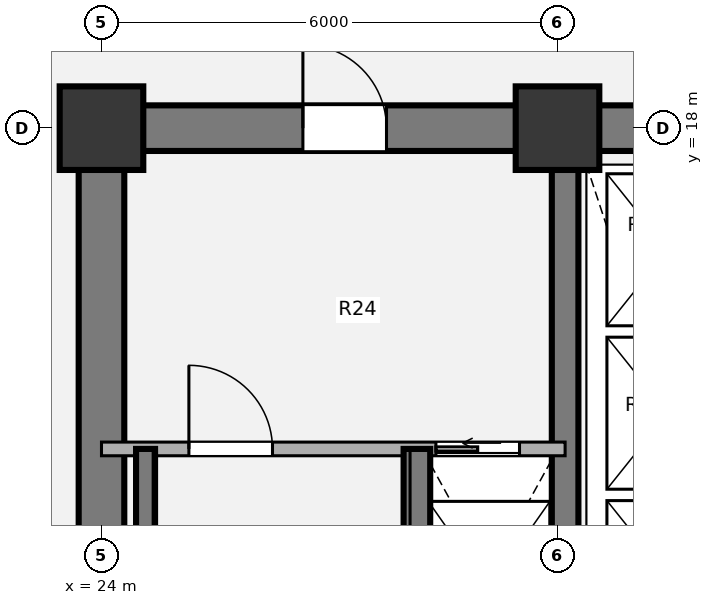
"""IFC4 building model, lengths in metres.
Left out: names, types, materials, properties, quantities, classifications, styles, units other than length and angle.
Written with IfcOpenShell. Run it as: python <this file> out.ifc"""

import sys

from ifc_helpers import new_model, si_unit, direction, frame, frame_2d, origin, origin_2d, place, context, subcontext, project, spatial, rectangle, extrude, source, transform, mapped, element, fill, save


model = new_model("IFC4")
c1 = context("Model", 3, precision=1e-05, world=origin(), true_north=direction((0.0, 1.0)))
c2 = subcontext(c1, "Body", "Model", "MODEL_VIEW")
j1 = project(units=[si_unit("LENGTHUNIT", "METRE"), si_unit("PLANEANGLEUNIT", "RADIAN")], contexts=[c1])
p1 = place(None, origin())
s1 = spatial("IfcSite", under=j1, at=p1, CompositionType="ELEMENT")
p2 = place(p1, origin())
s2 = spatial("IfcBuilding", under=s1, at=p2, CompositionType="ELEMENT")
p3 = place(p2, frame((0.0, 0.0, 38.34)))
s3 = spatial("IfcBuildingStorey", under=s2, at=p3, CompositionType="ELEMENT", Elevation=38.34)
m1 = source(origin(), c2, "Body", "SweptSolid", [
    extrude(rectangle(XDim=1.1, YDim=1.1, at=origin_2d()), origin(), (0.0, 0.0, 1.0), 3.78),
])
for number, where, z_axis, x_axis in (
    (1, (24.0, 18.0, 0.0), (0.0, 0.0, 1.0), (1.0, 0.0, 0.0)),
    (2, (30.0, 18.0, 0.0), (0.0, 0.0, 1.0), (1.0, 0.0, 0.0)),
):
    element("IfcColumn", number, at=place(p3, frame(where, z_axis=z_axis, x_axis=x_axis)), inside=s3, PredefinedType="COLUMN", context=c2, shape_type="MappedRepresentation", body=[
        mapped(m1, transform((0.0, 0.0, 0.0), x_axis=(1.0, 0.0, 0.0), y_axis=(0.0, 1.0, 0.0), z_axis=(0.0, 0.0, 1.0), scale=1.0)),
    ])
p4 = place(p3, frame((24.0, 6.0, 0.0), z_axis=(0.0, 0.0, 1.0), x_axis=(0.0, 1.0, 0.0)))
e3 = element("IfcWall", 3, at=p4, inside=s3, PredefinedType="SHEAR", context=c2, shape_type="SweptSolid", body=[
    extrude(rectangle(XDim=12.0, YDim=0.6, at=frame_2d((6.0, 0.0))), origin(), (0.0, 0.0, 1.0), 3.78),
])
p5 = place(p3, frame((23.7, 18.0, 0.0), z_axis=(0.0, 0.0, 1.0), x_axis=(1.0, 0.0, 0.0)))
e4 = element("IfcWall", 4, at=p5, inside=s3, PredefinedType="SHEAR", context=c2, shape_type="SweptSolid", body=[
    extrude(rectangle(XDim=9.5, YDim=0.6, at=frame_2d((4.75, 0.0))), origin(), (0.0, 0.0, 1.0), 3.78),
])
p6 = place(p5, frame((2.95, 0.0, 0.0)))
e5 = element("IfcOpeningElement", 5, at=p6, cuts=e4, PredefinedType="OPENING", context=c2, shape_type="SweptSolid", body=[
    extrude(rectangle(XDim=1.1, YDim=2.1, at=origin_2d()), frame((0.55, 0.31, 1.05), z_axis=(0.0, -1.0, 0.0), x_axis=(1.0, 0.0, 0.0)), (0.0, 0.0, 1.0), 0.62),
])
p7 = place(p3, frame((30.1, 6.0, 0.0), z_axis=(0.0, 0.0, 1.0), x_axis=(0.0, 1.0, 0.0)))
e6 = element("IfcWall", 6, at=p7, inside=s3, PredefinedType="SHEAR", context=c2, shape_type="SweptSolid", body=[
    extrude(rectangle(XDim=12.0, YDim=0.35, at=frame_2d((6.0, 0.0))), origin(), (0.0, 0.0, 1.0), 3.78),
])
p8 = place(p3, frame((24.0, 13.78, 0.0), z_axis=(0.0, 0.0, 1.0), x_axis=(1.0, 0.0, 0.0)))
e7 = element("IfcWall", 7, at=p8, inside=s3, PredefinedType="PARTITIONING", context=c2, shape_type="SweptSolid", body=[
    extrude(rectangle(XDim=6.1, YDim=0.18, at=frame_2d((3.05, 0.0))), origin(), (0.0, 0.0, 1.0), 3.5),
])
p9 = place(p8, frame((1.15, 0.0, 0.0)))
e8 = element("IfcOpeningElement", 8, at=p9, cuts=e7, PredefinedType="OPENING", context=c2, shape_type="SweptSolid", body=[
    extrude(rectangle(XDim=1.1, YDim=2.1, at=origin_2d()), frame((0.55, 0.1, 1.05), z_axis=(0.0, -1.0, 0.0), x_axis=(1.0, 0.0, 0.0)), (0.0, 0.0, 1.0), 0.2),
])
p10 = place(p8, frame((4.4, 0.0, 0.0)))
e9 = element("IfcOpeningElement", 9, at=p10, cuts=e7, PredefinedType="OPENING", context=c2, shape_type="SweptSolid", body=[
    extrude(rectangle(XDim=1.1, YDim=2.1, at=origin_2d()), frame((0.55, 0.1, 1.05), z_axis=(0.0, -1.0, 0.0), x_axis=(1.0, 0.0, 0.0)), (0.0, 0.0, 1.0), 0.2),
])
p11 = place(p3, frame((28.15, 6.0, 0.0), z_axis=(0.0, 0.0, 1.0), x_axis=(0.0, 1.0, 0.0)))
e10 = element("IfcWall", 10, at=p11, inside=s3, PredefinedType="SHEAR", context=c2, shape_type="SweptSolid", body=[
    extrude(rectangle(XDim=7.78, YDim=0.35, at=frame_2d((3.89, 0.0))), origin(), (0.0, 0.0, 1.0), 3.85),
])
p12 = place(p3, frame((24.58, 6.0, 0.0), z_axis=(0.0, 0.0, 1.0), x_axis=(0.0, 1.0, 0.0)))
e11 = element("IfcWall", 11, at=p12, inside=s3, PredefinedType="SHEAR", context=c2, shape_type="SweptSolid", body=[
    extrude(rectangle(XDim=7.78, YDim=0.25, at=frame_2d((3.89, 0.0))), origin(), (0.0, 0.0, 1.0), 3.85),
])
m2 = source(origin(), c2, "Body", "SweptSolid", [
    extrude(rectangle(XDim=1.1, YDim=2.1, at=origin_2d()), frame((0.55, 0.025, 1.05), z_axis=(0.0, -1.0, 0.0), x_axis=(1.0, 0.0, 0.0)), (0.0, 0.0, 1.0), 0.05),
])
p13 = place(p9, origin())
e12 = element("IfcDoor", 12, at=p13, inside=s3, OperationType="SINGLE_SWING_LEFT", PredefinedType="DOOR", context=c2, shape_type="MappedRepresentation", body=[
    mapped(m2, transform((0.0, 0.0, 0.0), x_axis=(1.0, 0.0, 0.0), y_axis=(0.0, 1.0, 0.0), z_axis=(0.0, 0.0, 1.0), scale=1.0)),
])
fill(e8, e12)
m3 = source(origin(), c2, "Body", "SweptSolid", [
    extrude(rectangle(XDim=1.1, YDim=2.1, at=origin_2d()), frame((0.55, 0.025, 1.05), z_axis=(0.0, -1.0, 0.0), x_axis=(1.0, 0.0, 0.0)), (0.0, 0.0, 1.0), 0.05),
])
p14 = place(p10, origin())
e13 = element("IfcDoor", 13, at=p14, inside=s3, OperationType="SLIDING_TO_LEFT", PredefinedType="DOOR", context=c2, shape_type="MappedRepresentation", body=[
    mapped(m3, transform((0.0, 0.0, 0.0), x_axis=(1.0, 0.0, 0.0), y_axis=(0.0, 1.0, 0.0), z_axis=(0.0, 0.0, 1.0), scale=1.0)),
])
fill(e9, e13)
m4 = source(origin(), c2, "Body", "SweptSolid", [
    extrude(rectangle(XDim=1.1, YDim=2.1, at=origin_2d()), frame((0.55, 0.025, 1.05), z_axis=(0.0, -1.0, 0.0), x_axis=(1.0, 0.0, 0.0)), (0.0, 0.0, 1.0), 0.05),
])
p15 = place(p6, origin())
e14 = element("IfcDoor", 14, at=p15, inside=s3, OperationType="SINGLE_SWING_LEFT", PredefinedType="DOOR", context=c2, shape_type="MappedRepresentation", body=[
    mapped(m4, transform((0.0, 0.0, 0.0), x_axis=(1.0, 0.0, 0.0), y_axis=(0.0, 1.0, 0.0), z_axis=(0.0, 0.0, 1.0), scale=1.0)),
])
fill(e5, e14)
save(model, sys.argv[1])
